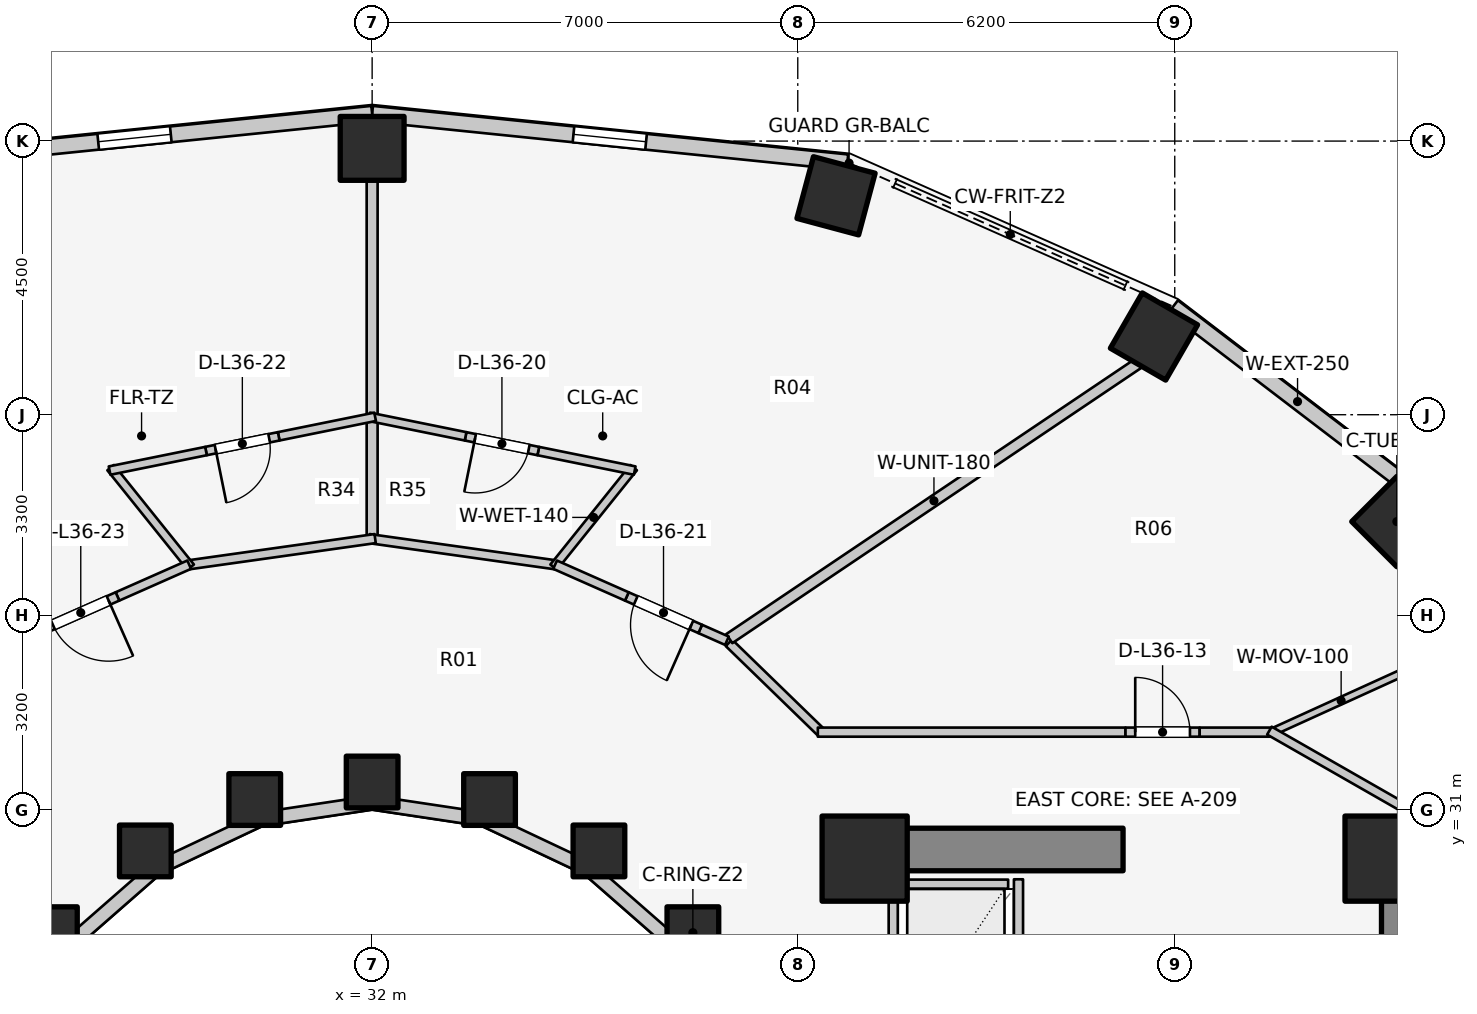
"""IFC4 building model, lengths in metres.
Left out: names, types, materials, properties, quantities, classifications, styles, units other than length and angle.
Written with IfcOpenShell. Run it as: python <this file> out.ifc"""

import sys

from ifc_helpers import new_model, si_unit, direction, frame, frame_2d, origin, origin_2d, place, context, subcontext, project, spatial, rectangle, extrude, element, fill, save


model = new_model("IFC4")
c1 = context("Model", 3, precision=1e-05, world=origin(), true_north=direction((0.0, 1.0)))
c2 = subcontext(c1, "Body", "Model", "MODEL_VIEW")
j1 = project(units=[si_unit("LENGTHUNIT", "METRE"), si_unit("PLANEANGLEUNIT", "RADIAN")], contexts=[c1])
p1 = place(None, origin())
s1 = spatial("IfcSite", under=j1, at=p1, CompositionType="ELEMENT")
p2 = place(p1, origin())
s2 = spatial("IfcBuilding", under=s1, at=p2, CompositionType="ELEMENT")
p3 = place(p2, frame((0.0, 0.0, 119.7)))
s3 = spatial("IfcBuildingStorey", under=s2, at=p3, CompositionType="ELEMENT", Elevation=119.7)
p4 = place(p3, frame((48.95, 17.05, 0.0), z_axis=(0.0, 0.0, 1.0), x_axis=(0.0, 1.0, 0.0)))
e1 = element("IfcWall", 1, at=p4, inside=s3, PredefinedType="SHEAR", context=c2, shape_type="SweptSolid", body=[
    extrude(rectangle(XDim=12.8, YDim=0.7, at=frame_2d((6.4, 0.0))), origin(), (0.0, 0.0, 1.0), 3.1),
])
p5 = place(p3, frame((39.85, 30.35, 0.0), z_axis=(0.0, 0.0, 1.0), x_axis=(1.0, 0.0, 0.0)))
e2 = element("IfcWall", 2, at=p5, inside=s3, PredefinedType="SHEAR", context=c2, shape_type="SweptSolid", body=[
    extrude(rectangle(XDim=4.5, YDim=0.7, at=frame_2d((2.25, 0.0))), origin(), (0.0, 0.0, 1.0), 3.1),
])
for number, where, z_axis, x_axis in (
    (3, (48.7, 30.2, 0.0), (0.0, 0.0, 1.0), (1.0, 0.0, 0.0)),
    (4, (40.1, 30.2, 0.0), (0.0, 0.0, 1.0), (1.0, 0.0, 0.0)),
):
    element("IfcColumn", number, at=place(p3, frame(where, z_axis=z_axis, x_axis=x_axis)), inside=s3, PredefinedType="COLUMN", context=c2, shape_type="SweptSolid", body=[
        extrude(rectangle(XDim=1.4, YDim=1.4, at=origin_2d()), origin(), (0.0, 0.0, 1.0), 3.1),
    ])
p6 = place(p3, frame((37.275, 28.982, 0.0), z_axis=(0.0, 0.0, 1.0), x_axis=(1.0, 0.0, 0.0)))
e5 = element("IfcColumn", 5, at=p6, inside=s3, PredefinedType="COLUMN", context=c2, shape_type="SweptSolid", body=[
    extrude(rectangle(XDim=0.85, YDim=0.85, at=origin_2d()), origin(), (0.0, 0.0, 1.0), 3.1),
])
p7 = place(p3, frame((48.853, 35.743, 0.0), z_axis=(0.0, 0.0, 1.0), x_axis=(0.707106781187, 0.707106781187, 0.0)))
e6 = element("IfcColumn", 6, at=p7, inside=s3, PredefinedType="COLUMN", context=c2, shape_type="SweptSolid", body=[
    extrude(rectangle(XDim=1.05, YDim=1.05, at=origin_2d()), origin(), (0.0, 0.0, 1.0), 3.1),
])
p8 = place(p3, frame((35.73, 30.327, 0.0), z_axis=(0.0, 0.0, 1.0), x_axis=(1.0, 0.0, 0.0)))
e7 = element("IfcColumn", 7, at=p8, inside=s3, PredefinedType="COLUMN", context=c2, shape_type="SweptSolid", body=[
    extrude(rectangle(XDim=0.85, YDim=0.85, at=origin_2d()), origin(), (0.0, 0.0, 1.0), 3.1),
])
p9 = place(p3, frame((44.858, 38.786, 0.0), z_axis=(0.0, 0.0, 1.0), x_axis=(0.5, 0.866025403784, 0.0)))
e8 = element("IfcColumn", 8, at=p9, inside=s3, PredefinedType="COLUMN", context=c2, shape_type="SweptSolid", body=[
    extrude(rectangle(XDim=1.05, YDim=1.05, at=origin_2d()), origin(), (0.0, 0.0, 1.0), 3.1),
])
p10 = place(p3, frame((33.931, 31.172, 0.0), z_axis=(0.0, 0.0, 1.0), x_axis=(1.0, 0.0, 0.0)))
e9 = element("IfcColumn", 9, at=p10, inside=s3, PredefinedType="COLUMN", context=c2, shape_type="SweptSolid", body=[
    extrude(rectangle(XDim=0.85, YDim=0.85, at=origin_2d()), origin(), (0.0, 0.0, 1.0), 3.1),
])
p11 = place(p3, frame((39.629, 41.1, 0.0), z_axis=(0.0, 0.0, 1.0), x_axis=(0.258819045103, 0.965925826289, 0.0)))
e10 = element("IfcColumn", 10, at=p11, inside=s3, PredefinedType="COLUMN", context=c2, shape_type="SweptSolid", body=[
    extrude(rectangle(XDim=1.05, YDim=1.05, at=origin_2d()), origin(), (0.0, 0.0, 1.0), 3.1),
])
p12 = place(p3, frame((32.0, 31.46, 0.0), z_axis=(0.0, 0.0, 1.0), x_axis=(1.0, 0.0, 0.0)))
e11 = element("IfcColumn", 11, at=p12, inside=s3, PredefinedType="COLUMN", context=c2, shape_type="SweptSolid", body=[
    extrude(rectangle(XDim=0.85, YDim=0.85, at=origin_2d()), origin(), (0.0, 0.0, 1.0), 3.1),
])
p13 = place(p3, frame((32.0, 41.88, 0.0), z_axis=(0.0, 0.0, 1.0), x_axis=(0.0, 1.0, 0.0)))
e12 = element("IfcColumn", 12, at=p13, inside=s3, PredefinedType="COLUMN", context=c2, shape_type="SweptSolid", body=[
    extrude(rectangle(XDim=1.05, YDim=1.05, at=origin_2d()), origin(), (0.0, 0.0, 1.0), 3.1),
])
for number, where, z_axis, x_axis in (
    (13, (30.069, 31.172, 0.0), (0.0, 0.0, 1.0), (1.0, 0.0, 0.0)),
    (14, (28.27, 30.327, 0.0), (0.0, 0.0, 1.0), (1.0, 0.0, 0.0)),
    (15, (26.725, 28.982, 0.0), (0.0, 0.0, 1.0), (1.0, 0.0, 0.0)),
):
    element("IfcColumn", number, at=place(p3, frame(where, z_axis=z_axis, x_axis=x_axis)), inside=s3, PredefinedType="COLUMN", context=c2, shape_type="SweptSolid", body=[
        extrude(rectangle(XDim=0.85, YDim=0.85, at=origin_2d()), origin(), (0.0, 0.0, 1.0), 3.1),
    ])
p14 = place(p3, frame((37.035, 28.742, 0.0), z_axis=(0.0, 0.0, 1.0), x_axis=(-0.752576694707, 0.658504607869, 0.0)))
e16 = element("IfcWall", 16, at=p14, inside=s3, PredefinedType="STANDARD", context=c2, shape_type="SweptSolid", body=[
    extrude(rectangle(XDim=1.959, YDim=0.23, at=frame_2d((0.98, 0.0))), origin(), (0.0, 0.0, 1.0), 1.22),
])
p15 = place(p3, frame((35.56, 30.032, 0.0), z_axis=(0.0, 0.0, 1.0), x_axis=(-0.904179699603, 0.427152280606, 0.0)))
e17 = element("IfcWall", 17, at=p15, inside=s3, PredefinedType="STANDARD", context=c2, shape_type="SweptSolid", body=[
    extrude(rectangle(XDim=1.899, YDim=0.23, at=frame_2d((0.95, 0.0))), origin(), (0.0, 0.0, 1.0), 1.22),
])
for number, where, z_axis, x_axis in (
    (18, (33.843, 30.843, 0.0), (0.0, 0.0, 1.0), (-0.989, 0.149, 0.0)),
    (19, (32.0, 31.12, 0.0), (0.0, 0.0, 1.0), (-0.989, -0.149, 0.0)),
):
    element("IfcWall", number, at=place(p3, frame(where, z_axis=z_axis, x_axis=x_axis)), inside=s3, PredefinedType="STANDARD", context=c2, shape_type="SweptSolid", body=[
        extrude(rectangle(XDim=1.864, YDim=0.23, at=frame_2d((0.932, 0.0))), origin(), (0.0, 0.0, 1.0), 1.22),
    ])
p16 = place(p3, frame((30.157, 30.843, 0.0), z_axis=(0.0, 0.0, 1.0), x_axis=(-0.904179699603, -0.427152280606, 0.0)))
e20 = element("IfcWall", 20, at=p16, inside=s3, PredefinedType="STANDARD", context=c2, shape_type="SweptSolid", body=[
    extrude(rectangle(XDim=1.899, YDim=0.23, at=frame_2d((0.95, 0.0))), origin(), (0.0, 0.0, 1.0), 1.22),
])
p17 = place(p3, frame((28.44, 30.032, 0.0), z_axis=(0.0, 0.0, 1.0), x_axis=(-0.752576694707, -0.658504607869, 0.0)))
e21 = element("IfcWall", 21, at=p17, inside=s3, PredefinedType="STANDARD", context=c2, shape_type="SweptSolid", body=[
    extrude(rectangle(XDim=1.959, YDim=0.23, at=frame_2d((0.98, 0.0))), origin(), (0.0, 0.0, 1.0), 1.22),
])
p18 = place(p3, frame((49.266, 36.153, 0.0), z_axis=(0.0, 0.0, 1.0), x_axis=(-0.794809810864, 0.606858603427, 0.0)))
e22 = element("IfcWall", 22, at=p18, inside=s3, PredefinedType="STANDARD", context=c2, shape_type="SweptSolid", body=[
    extrude(rectangle(XDim=5.149, YDim=0.26, at=frame_2d((2.575, 0.0))), origin(), (0.0, 0.0, 1.0), 1.22),
])
p19 = place(p3, frame((39.816, 41.651, 0.0), z_axis=(0.0, 0.0, 1.0), x_axis=(-0.994821390558, 0.101638579726, 0.0)))
e23 = element("IfcWall", 23, at=p19, inside=s3, PredefinedType="STANDARD", context=c2, shape_type="SweptSolid", body=[
    extrude(rectangle(XDim=7.857, YDim=0.26, at=frame_2d((3.929, 0.0))), origin(), (0.0, 0.0, 1.0), 1.22),
])
p20 = place(p19, frame((3.329, 0.0, 0.15)))
e24 = element("IfcOpeningElement", 24, at=p20, cuts=e23, PredefinedType="OPENING", context=c2, shape_type="SweptSolid", body=[
    extrude(rectangle(XDim=1.2, YDim=0.9, at=frame_2d((0.6, 0.45))), frame((0.0, 0.14, 0.0), z_axis=(0.0, -1.0, 0.0), x_axis=(1.0, 0.0, 0.0)), (0.0, 0.0, 1.0), 0.28),
])
p21 = place(p3, frame((32.0, 42.449, 0.0), z_axis=(0.0, 0.0, 1.0), x_axis=(-0.994821390558, -0.101638579726, 0.0)))
e25 = element("IfcWall", 25, at=p21, inside=s3, PredefinedType="STANDARD", context=c2, shape_type="SweptSolid", body=[
    extrude(rectangle(XDim=7.857, YDim=0.26, at=frame_2d((3.929, 0.0))), origin(), (0.0, 0.0, 1.0), 1.22),
])
p22 = place(p21, frame((3.329, 0.0, 0.15)))
e26 = element("IfcOpeningElement", 26, at=p22, cuts=e25, PredefinedType="OPENING", context=c2, shape_type="SweptSolid", body=[
    extrude(rectangle(XDim=1.2, YDim=0.9, at=frame_2d((0.6, 0.45))), frame((0.0, 0.14, 0.0), z_axis=(0.0, -1.0, 0.0), x_axis=(1.0, 0.0, 0.0)), (0.0, 0.0, 1.0), 0.28),
])
p23 = place(p3, frame((40.74, 29.78, 0.0), z_axis=(0.0, 0.0, 1.0), x_axis=(1.0, 0.0, 0.0)))
e27 = element("IfcWall", 27, at=p23, inside=s3, PredefinedType="SOLIDWALL", context=c2, shape_type="SweptSolid", body=[
    extrude(rectangle(XDim=1.72, YDim=0.15, at=frame_2d((0.86, 0.0))), origin(), (0.0, 0.0, 1.0), 2.575),
])
for number, where, z_axis, x_axis in (
    (28, (40.57, 27.14, 0.0), (0.0, 0.0, 1.0), (0.0, 1.0, 0.0)),
    (29, (42.63, 27.14, 0.0), (0.0, 0.0, 1.0), (0.0, 1.0, 0.0)),
):
    element("IfcWall", number, at=place(p3, frame(where, z_axis=z_axis, x_axis=x_axis)), inside=s3, PredefinedType="SOLIDWALL", context=c2, shape_type="SweptSolid", body=[
        extrude(rectangle(XDim=2.72, YDim=0.15, at=frame_2d((1.36, 0.0))), origin(), (0.0, 0.0, 1.0), 2.575),
    ])
p24 = place(p3, frame((46.754, 32.259, 0.0), z_axis=(0.0, 0.0, 1.0), x_axis=(0.910131348923, 0.414319837453, 0.0)))
e30 = element("IfcWall", 30, at=p24, inside=s3, PredefinedType="MOVABLE", context=c2, shape_type="SweptSolid", body=[
    extrude(rectangle(XDim=2.597, YDim=0.12, at=frame_2d((1.299, 0.0))), origin(), (0.0, 0.0, 1.0), 1.22),
])
p25 = place(p3, frame((37.867, 33.749, 0.0), z_axis=(0.0, 0.0, 1.0), x_axis=(0.717419568599, -0.696641344302, 0.0)))
e31 = element("IfcWall", 31, at=p25, inside=s3, PredefinedType="PARTITIONING", context=c2, shape_type="SweptSolid", body=[
    extrude(rectangle(XDim=2.138, YDim=0.15, at=frame_2d((1.069, 0.0))), origin(), (0.0, 0.0, 1.0), 1.22),
])
p26 = place(p3, frame((39.33, 32.28, 0.0), z_axis=(0.0, 0.0, 1.0), x_axis=(1.0, 0.0, 0.0)))
e32 = element("IfcWall", 32, at=p26, inside=s3, PredefinedType="PARTITIONING", context=c2, shape_type="SweptSolid", body=[
    extrude(rectangle(XDim=5.06, YDim=0.15, at=frame_2d((2.53, 0.0))), origin(), (0.0, 0.0, 1.0), 1.22),
])
p27 = place(p3, frame((44.39, 32.28, 0.0), z_axis=(0.0, 0.0, 1.0), x_axis=(1.0, 0.0, 0.0)))
e33 = element("IfcWall", 33, at=p27, inside=s3, PredefinedType="PARTITIONING", context=c2, shape_type="SweptSolid", body=[
    extrude(rectangle(XDim=1.22, YDim=0.15, at=frame_2d((0.61, 0.0))), origin(), (0.0, 0.0, 1.0), 2.575),
])
p28 = place(p27, frame((0.16, 0.0, 0.0)))
e34 = element("IfcOpeningElement", 34, at=p28, cuts=e33, PredefinedType="OPENING", context=c2, shape_type="SweptSolid", body=[
    extrude(rectangle(XDim=0.9, YDim=2.1, at=frame_2d((0.45, 1.05))), frame((0.0, 0.085, 0.0), z_axis=(0.0, -1.0, 0.0), x_axis=(1.0, 0.0, 0.0)), (0.0, 0.0, 1.0), 0.17),
])
p29 = place(p3, frame((45.61, 32.28, 0.0), z_axis=(0.0, 0.0, 1.0), x_axis=(1.0, 0.0, 0.0)))
e35 = element("IfcWall", 35, at=p29, inside=s3, PredefinedType="PARTITIONING", context=c2, shape_type="SweptSolid", body=[
    extrude(rectangle(XDim=1.24, YDim=0.15, at=frame_2d((0.62, 0.0))), origin(), (0.0, 0.0, 1.0), 2.575),
])
p30 = place(p3, frame((46.757, 32.305, 0.0), z_axis=(0.0, 0.0, 1.0), x_axis=(0.867991349648, -0.496579315857, 0.0)))
e36 = element("IfcWall", 36, at=p30, inside=s3, PredefinedType="PARTITIONING", context=c2, shape_type="SweptSolid", body=[
    extrude(rectangle(XDim=2.567, YDim=0.15, at=frame_2d((1.283, 0.0))), origin(), (0.0, 0.0, 1.0), 1.22),
])
p31 = place(p3, frame((37.874, 33.818, 0.0), z_axis=(0.0, 0.0, 1.0), x_axis=(0.829603023521, 0.558353672295, 0.0)))
e37 = element("IfcWall", 37, at=p31, inside=s3, PredefinedType="PARTITIONING", context=c2, shape_type="SweptSolid", body=[
    extrude(rectangle(XDim=8.115, YDim=0.18, at=frame_2d((4.058, 0.0))), origin(), (0.0, 0.0, 1.0), 1.22),
])
p32 = place(p3, frame((32.0, 35.511, 0.0), z_axis=(0.0, 0.0, 1.0), x_axis=(0.0, 1.0, 0.0)))
e38 = element("IfcWall", 38, at=p32, inside=s3, PredefinedType="PARTITIONING", context=c2, shape_type="SweptSolid", body=[
    extrude(rectangle(XDim=5.864, YDim=0.18, at=frame_2d((2.932, 0.0))), origin(), (0.0, 0.0, 1.0), 1.22),
])
p33 = place(p3, frame((35.066, 35.025, 0.0), z_axis=(0.0, 0.0, 1.0), x_axis=(-0.990254405439, 0.139270285808, 0.0)))
e39 = element("IfcWall", 39, at=p33, inside=s3, PredefinedType="PARTITIONING", context=c2, shape_type="SweptSolid", body=[
    extrude(rectangle(XDim=3.147, YDim=0.15, at=frame_2d((1.573, 0.0))), origin(), (0.0, 0.0, 1.0), 1.22),
])
p34 = place(p3, frame((34.986, 34.993, 0.0), z_axis=(0.0, 0.0, 1.0), x_axis=(0.626196812755, 0.779665025313, 0.0)))
e40 = element("IfcWall", 40, at=p34, inside=s3, PredefinedType="PLUMBINGWALL", context=c2, shape_type="SweptSolid", body=[
    extrude(rectangle(XDim=2.1, YDim=0.14, at=frame_2d((1.05, 0.0))), origin(), (0.0, 0.0, 1.0), 2.105),
])
p35 = place(p3, frame((36.318, 36.581, 0.0), z_axis=(0.0, 0.0, 1.0), x_axis=(-0.980084252106, 0.198582120981, 0.0)))
e41 = element("IfcWall", 41, at=p35, inside=s3, PredefinedType="PLUMBINGWALL", context=c2, shape_type="SweptSolid", body=[
    extrude(rectangle(XDim=1.618, YDim=0.14, at=frame_2d((0.809, 0.0))), origin(), (0.0, 0.0, 1.0), 2.575),
])
p36 = place(p3, frame((34.732, 36.902, 0.0), z_axis=(0.0, 0.0, 1.0), x_axis=(-0.980100606421, 0.198501388642, 0.0)))
e42 = element("IfcWall", 42, at=p36, inside=s3, PredefinedType="PLUMBINGWALL", context=c2, shape_type="SweptSolid", body=[
    extrude(rectangle(XDim=1.22, YDim=0.14, at=frame_2d((0.61, 0.0))), origin(), (0.0, 0.0, 1.0), 2.575),
])
p37 = place(p36, frame((0.16, 0.0, 0.0)))
e43 = element("IfcOpeningElement", 43, at=p37, cuts=e42, PredefinedType="OPENING", context=c2, shape_type="SweptSolid", body=[
    extrude(rectangle(XDim=0.9, YDim=2.1, at=frame_2d((0.45, 1.05))), frame((0.0, 0.08, 0.0), z_axis=(0.0, -1.0, 0.0), x_axis=(1.0, 0.0, 0.0)), (0.0, 0.0, 1.0), 0.16),
])
p38 = place(p3, frame((33.537, 37.145, 0.0), z_axis=(0.0, 0.0, 1.0), x_axis=(-0.980084252106, 0.198582120981, 0.0)))
e44 = element("IfcWall", 44, at=p38, inside=s3, PredefinedType="PLUMBINGWALL", context=c2, shape_type="SweptSolid", body=[
    extrude(rectangle(XDim=1.618, YDim=0.14, at=frame_2d((0.809, 0.0))), origin(), (0.0, 0.0, 1.0), 1.22),
])
p39 = place(p3, frame((37.835, 33.783, 0.0), z_axis=(0.0, 0.0, 1.0), x_axis=(-0.914564252461, 0.404440636088, 0.0)))
e45 = element("IfcWall", 45, at=p39, inside=s3, PredefinedType="PARTITIONING", context=c2, shape_type="SweptSolid", body=[
    extrude(rectangle(XDim=0.48, YDim=0.15, at=frame_2d((0.24, 0.0))), origin(), (0.0, 0.0, 1.0), 2.575),
])
p40 = place(p3, frame((37.396, 33.977, 0.0), z_axis=(0.0, 0.0, 1.0), x_axis=(-0.914352324799, 0.404919530444, 0.0)))
e46 = element("IfcWall", 46, at=p40, inside=s3, PredefinedType="PARTITIONING", context=c2, shape_type="SweptSolid", body=[
    extrude(rectangle(XDim=1.32, YDim=0.15, at=frame_2d((0.66, 0.0))), origin(), (0.0, 0.0, 1.0), 2.16),
])
p41 = place(p40, frame((0.16, 0.0, 0.0)))
e47 = element("IfcOpeningElement", 47, at=p41, cuts=e46, PredefinedType="OPENING", context=c2, shape_type="SweptSolid", body=[
    extrude(rectangle(XDim=1.0, YDim=2.1, at=frame_2d((0.5, 1.05))), frame((0.0, 0.085, 0.0), z_axis=(0.0, -1.0, 0.0), x_axis=(1.0, 0.0, 0.0)), (0.0, 0.0, 1.0), 0.17),
])
p42 = place(p3, frame((36.189, 34.512, 0.0), z_axis=(0.0, 0.0, 1.0), x_axis=(-0.914512451665, 0.404557753292, 0.0)))
e48 = element("IfcWall", 48, at=p42, inside=s3, PredefinedType="PARTITIONING", context=c2, shape_type="SweptSolid", body=[
    extrude(rectangle(XDim=1.29, YDim=0.15, at=frame_2d((0.645, 0.0))), origin(), (0.0, 0.0, 1.0), 1.22),
])
p43 = place(p3, frame((32.05, 35.463, 0.0), z_axis=(0.0, 0.0, 1.0), x_axis=(-0.990254405439, -0.139270285808, 0.0)))
e49 = element("IfcWall", 49, at=p43, inside=s3, PredefinedType="PARTITIONING", context=c2, shape_type="SweptSolid", body=[
    extrude(rectangle(XDim=3.147, YDim=0.15, at=frame_2d((1.573, 0.0))), origin(), (0.0, 0.0, 1.0), 1.22),
])
p44 = place(p3, frame((29.014, 34.993, 0.0), z_axis=(0.0, 0.0, 1.0), x_axis=(-0.626196812755, 0.779665025313, 0.0)))
e50 = element("IfcWall", 50, at=p44, inside=s3, PredefinedType="PLUMBINGWALL", context=c2, shape_type="SweptSolid", body=[
    extrude(rectangle(XDim=2.1, YDim=0.14, at=frame_2d((1.05, 0.0))), origin(), (0.0, 0.0, 1.0), 2.105),
])
p45 = place(p3, frame((32.049, 37.466, 0.0), z_axis=(0.0, 0.0, 1.0), x_axis=(-0.980090201438, -0.198552756326, 0.0)))
e51 = element("IfcWall", 51, at=p45, inside=s3, PredefinedType="PLUMBINGWALL", context=c2, shape_type="SweptSolid", body=[
    extrude(rectangle(XDim=1.618, YDim=0.14, at=frame_2d((0.809, 0.0))), origin(), (0.0, 0.0, 1.0), 1.22),
])
p46 = place(p3, frame((30.463, 37.145, 0.0), z_axis=(0.0, 0.0, 1.0), x_axis=(-0.980092719514, -0.198540326273, 0.0)))
e52 = element("IfcWall", 52, at=p46, inside=s3, PredefinedType="PLUMBINGWALL", context=c2, shape_type="SweptSolid", body=[
    extrude(rectangle(XDim=1.22, YDim=0.14, at=frame_2d((0.61, 0.0))), origin(), (0.0, 0.0, 1.0), 2.575),
])
p47 = place(p46, frame((0.16, 0.0, 0.0)))
e53 = element("IfcOpeningElement", 53, at=p47, cuts=e52, PredefinedType="OPENING", context=c2, shape_type="SweptSolid", body=[
    extrude(rectangle(XDim=0.9, YDim=2.1, at=frame_2d((0.45, 1.05))), frame((0.0, 0.08, 0.0), z_axis=(0.0, -1.0, 0.0), x_axis=(1.0, 0.0, 0.0)), (0.0, 0.0, 1.0), 0.16),
])
p48 = place(p3, frame((29.268, 36.902, 0.0), z_axis=(0.0, 0.0, 1.0), x_axis=(-0.980084252106, -0.198582120981, 0.0)))
e54 = element("IfcWall", 54, at=p48, inside=s3, PredefinedType="PLUMBINGWALL", context=c2, shape_type="SweptSolid", body=[
    extrude(rectangle(XDim=1.618, YDim=0.14, at=frame_2d((0.809, 0.0))), origin(), (0.0, 0.0, 1.0), 2.575),
])
p49 = place(p3, frame((28.991, 35.034, 0.0), z_axis=(0.0, 0.0, 1.0), x_axis=(-0.914512451665, -0.404557753292, 0.0)))
e55 = element("IfcWall", 55, at=p49, inside=s3, PredefinedType="PARTITIONING", context=c2, shape_type="SweptSolid", body=[
    extrude(rectangle(XDim=1.29, YDim=0.15, at=frame_2d((0.645, 0.0))), origin(), (0.0, 0.0, 1.0), 1.22),
])
p50 = place(p3, frame((27.811, 34.512, 0.0), z_axis=(0.0, 0.0, 1.0), x_axis=(-0.914352324799, -0.404919530444, 0.0)))
e56 = element("IfcWall", 56, at=p50, inside=s3, PredefinedType="PARTITIONING", context=c2, shape_type="SweptSolid", body=[
    extrude(rectangle(XDim=1.32, YDim=0.15, at=frame_2d((0.66, 0.0))), origin(), (0.0, 0.0, 1.0), 2.16),
])
p51 = place(p50, frame((0.16, 0.0, 0.0)))
e57 = element("IfcOpeningElement", 57, at=p51, cuts=e56, PredefinedType="OPENING", context=c2, shape_type="SweptSolid", body=[
    extrude(rectangle(XDim=1.0, YDim=2.1, at=frame_2d((0.5, 1.05))), frame((0.0, 0.085, 0.0), z_axis=(0.0, -1.0, 0.0), x_axis=(1.0, 0.0, 0.0)), (0.0, 0.0, 1.0), 0.17),
])
p52 = place(p20, origin())
e58 = element("IfcWindow", 58, at=p52, inside=s3, PartitioningType="SINGLE_PANEL", PredefinedType="WINDOW", context=c2, shape_type="SweptSolid", body=[
    extrude(rectangle(XDim=1.2, YDim=0.9, at=frame_2d((0.6, 0.45))), frame((0.0, 0.03, 0.0), z_axis=(0.0, -1.0, 0.0), x_axis=(1.0, 0.0, 0.0)), (0.0, 0.0, 1.0), 0.06),
])
fill(e24, e58)
p53 = place(p22, origin())
e59 = element("IfcWindow", 59, at=p53, inside=s3, PartitioningType="SINGLE_PANEL", PredefinedType="WINDOW", context=c2, shape_type="SweptSolid", body=[
    extrude(rectangle(XDim=1.2, YDim=0.9, at=frame_2d((0.6, 0.45))), frame((0.0, 0.03, 0.0), z_axis=(0.0, -1.0, 0.0), x_axis=(1.0, 0.0, 0.0)), (0.0, 0.0, 1.0), 0.06),
])
fill(e26, e59)
p54 = place(p28, origin())
e60 = element("IfcDoor", 60, at=p54, inside=s3, OperationType="SINGLE_SWING_LEFT", PredefinedType="DOOR", context=c2, shape_type="SweptSolid", body=[
    extrude(rectangle(XDim=0.9, YDim=2.1, at=frame_2d((0.45, 1.05))), frame((0.0, 0.025, 0.0), z_axis=(0.0, -1.0, 0.0), x_axis=(1.0, 0.0, 0.0)), (0.0, 0.0, 1.0), 0.05),
])
fill(e34, e60)
p55 = place(p37, origin())
e61 = element("IfcDoor", 61, at=p55, inside=s3, OperationType="SINGLE_SWING_RIGHT", PredefinedType="DOOR", context=c2, shape_type="SweptSolid", body=[
    extrude(rectangle(XDim=0.9, YDim=2.1, at=frame_2d((0.45, 1.05))), frame((0.0, 0.025, 0.0), z_axis=(0.0, -1.0, 0.0), x_axis=(1.0, 0.0, 0.0)), (0.0, 0.0, 1.0), 0.05),
])
fill(e43, e61)
p56 = place(p41, origin())
e62 = element("IfcDoor", 62, at=p56, inside=s3, OperationType="SINGLE_SWING_LEFT", PredefinedType="DOOR", context=c2, shape_type="SweptSolid", body=[
    extrude(rectangle(XDim=1.0, YDim=2.1, at=frame_2d((0.5, 1.05))), frame((0.0, 0.025, 0.0), z_axis=(0.0, -1.0, 0.0), x_axis=(1.0, 0.0, 0.0)), (0.0, 0.0, 1.0), 0.05),
])
fill(e47, e62)
p57 = place(p47, origin())
e63 = element("IfcDoor", 63, at=p57, inside=s3, OperationType="SINGLE_SWING_RIGHT", PredefinedType="DOOR", context=c2, shape_type="SweptSolid", body=[
    extrude(rectangle(XDim=0.9, YDim=2.1, at=frame_2d((0.45, 1.05))), frame((0.0, 0.025, 0.0), z_axis=(0.0, -1.0, 0.0), x_axis=(1.0, 0.0, 0.0)), (0.0, 0.0, 1.0), 0.05),
])
fill(e53, e63)
p58 = place(p51, origin())
e64 = element("IfcDoor", 64, at=p58, inside=s3, OperationType="SINGLE_SWING_LEFT", PredefinedType="DOOR", context=c2, shape_type="SweptSolid", body=[
    extrude(rectangle(XDim=1.0, YDim=2.1, at=frame_2d((0.5, 1.05))), frame((0.0, 0.025, 0.0), z_axis=(0.0, -1.0, 0.0), x_axis=(1.0, 0.0, 0.0)), (0.0, 0.0, 1.0), 0.05),
])
fill(e57, e64)
save(model, sys.argv[1])
